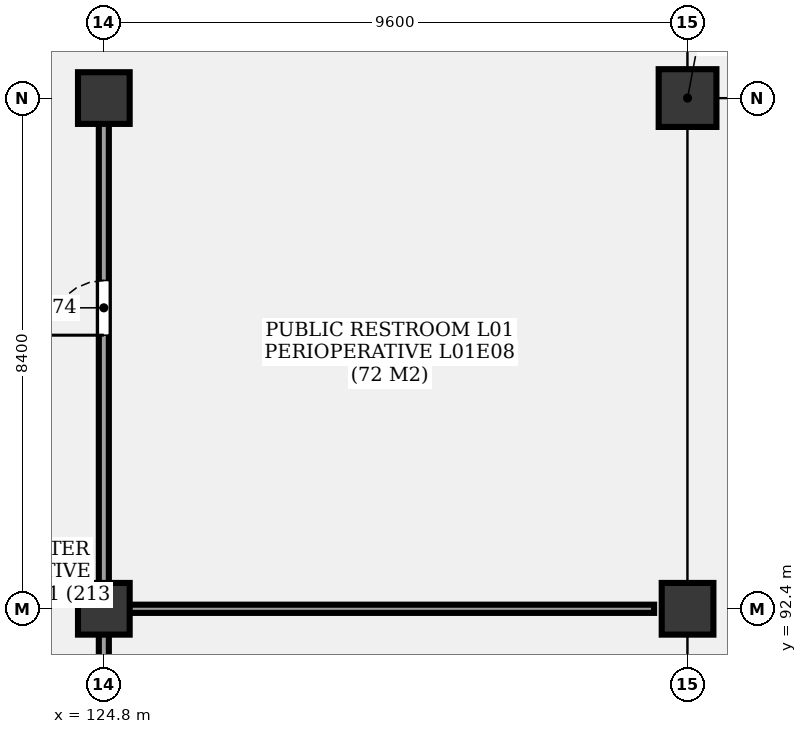
"""IFC4 building model, lengths in metres.
Left out: names, types, materials, properties, quantities, classifications, styles, units other than length and angle.
Written with IfcOpenShell. Run it as: python <this file> out.ifc"""

import sys

from ifc_helpers import new_model, si_unit, direction, frame, frame_2d, origin, origin_2d, place, context, subcontext, project, spatial, rectangle, extrude, element, fill, save


model = new_model("IFC4")
c1 = context("Model", 3, precision=1e-05, world=origin(), true_north=direction((0.0, 1.0)))
c2 = subcontext(c1, "Body", "Model", "MODEL_VIEW")
j1 = project(units=[si_unit("LENGTHUNIT", "METRE"), si_unit("PLANEANGLEUNIT", "RADIAN")], contexts=[c1])
p1 = place(None, origin())
s1 = spatial("IfcSite", under=j1, at=p1, CompositionType="ELEMENT")
p2 = place(p1, origin())
s2 = spatial("IfcBuilding", under=s1, at=p2, CompositionType="ELEMENT")
p3 = place(p2, frame((0.0, 0.0, 5.1)))
s3 = spatial("IfcBuildingStorey", under=s2, at=p3, CompositionType="ELEMENT", Elevation=5.1)
for number, where, z_axis, x_axis in (
    (1, (124.8, 92.4, 0.0), (0.0, 0.0, 1.0), (1.0, 0.0, 0.0)),
    (2, (124.8, 100.8, 0.0), (0.0, 0.0, 1.0), (1.0, 0.0, 0.0)),
    (3, (134.4, 92.4, 0.0), (0.0, 0.0, 1.0), (1.0, 0.0, 0.0)),
):
    element("IfcColumn", number, at=place(p3, frame(where, z_axis=z_axis, x_axis=x_axis)), inside=s3, PredefinedType="COLUMN", context=c2, shape_type="SweptSolid", body=[
        extrude(rectangle(XDim=0.85, YDim=0.85, at=origin_2d()), origin(), (0.0, 0.0, 1.0), 4.8),
    ])
p4 = place(p3, frame((134.4, 100.8, 0.0), z_axis=(0.0, 0.0, 1.0), x_axis=(1.0, 0.0, 0.0)))
e4 = element("IfcColumn", 4, at=p4, inside=s3, PredefinedType="COLUMN", context=c2, shape_type="SweptSolid", body=[
    extrude(rectangle(XDim=0.95, YDim=0.95, at=origin_2d()), origin(), (0.0, 0.0, 1.0), 4.8),
])
p5 = place(p3, frame((124.8, 84.25, 0.0), z_axis=(0.0, 0.0, 1.0), x_axis=(0.0, 1.0, 0.0)))
e5 = element("IfcWall", 5, at=p5, inside=s3, PredefinedType="PARTITIONING", context=c2, shape_type="SweptSolid", body=[
    extrude(rectangle(XDim=7.9, YDim=0.165, at=frame_2d((3.95, 0.0))), origin(), (0.0, 0.0, 1.0), 3.68),
])
p6 = place(p5, frame((4.25, 0.0, 0.0)))
e6 = element("IfcOpeningElement", 6, at=p6, cuts=e5, PredefinedType="OPENING", context=c2, shape_type="SweptSolid", body=[
    extrude(rectangle(XDim=1.0, YDim=2.2, at=frame_2d((0.5, 1.1))), frame((0.0, 0.093, 0.0), z_axis=(0.0, -1.0, 0.0), x_axis=(1.0, 0.0, 0.0)), (0.0, 0.0, 1.0), 0.185),
])
p7 = place(p3, frame((124.8, 92.65, 0.0), z_axis=(0.0, 0.0, 1.0), x_axis=(0.0, 1.0, 0.0)))
e7 = element("IfcWall", 7, at=p7, inside=s3, PredefinedType="PARTITIONING", context=c2, shape_type="SweptSolid", body=[
    extrude(rectangle(XDim=7.9, YDim=0.165, at=frame_2d((3.95, 0.0))), origin(), (0.0, 0.0, 1.0), 3.68),
])
p8 = place(p7, frame((4.25, 0.0, 0.0)))
e8 = element("IfcOpeningElement", 8, at=p8, cuts=e7, PredefinedType="OPENING", context=c2, shape_type="SweptSolid", body=[
    extrude(rectangle(XDim=0.9, YDim=2.1, at=frame_2d((0.45, 1.05))), frame((0.0, 0.093, 0.0), z_axis=(0.0, -1.0, 0.0), x_axis=(1.0, 0.0, 0.0)), (0.0, 0.0, 1.0), 0.185),
])
p9 = place(p3, frame((124.95, 92.4, 0.0), z_axis=(0.0, 0.0, 1.0), x_axis=(1.0, 0.0, 0.0)))
e9 = element("IfcWall", 9, at=p9, inside=s3, PredefinedType="PARTITIONING", context=c2, shape_type="SweptSolid", body=[
    extrude(rectangle(XDim=8.9, YDim=0.135, at=frame_2d((4.45, 0.0))), origin(), (0.0, 0.0, 1.0), 3.68),
])
p10 = place(p8, origin())
e10 = element("IfcDoor", 10, at=p10, inside=s3, OperationType="SINGLE_SWING_LEFT", PredefinedType="DOOR", context=c2, shape_type="SweptSolid", body=[
    extrude(rectangle(XDim=0.9, YDim=2.1, at=frame_2d((0.45, 1.05))), frame((0.0, 0.025, 0.0), z_axis=(0.0, -1.0, 0.0), x_axis=(1.0, 0.0, 0.0)), (0.0, 0.0, 1.0), 0.05),
])
fill(e8, e10)
save(model, sys.argv[1])
